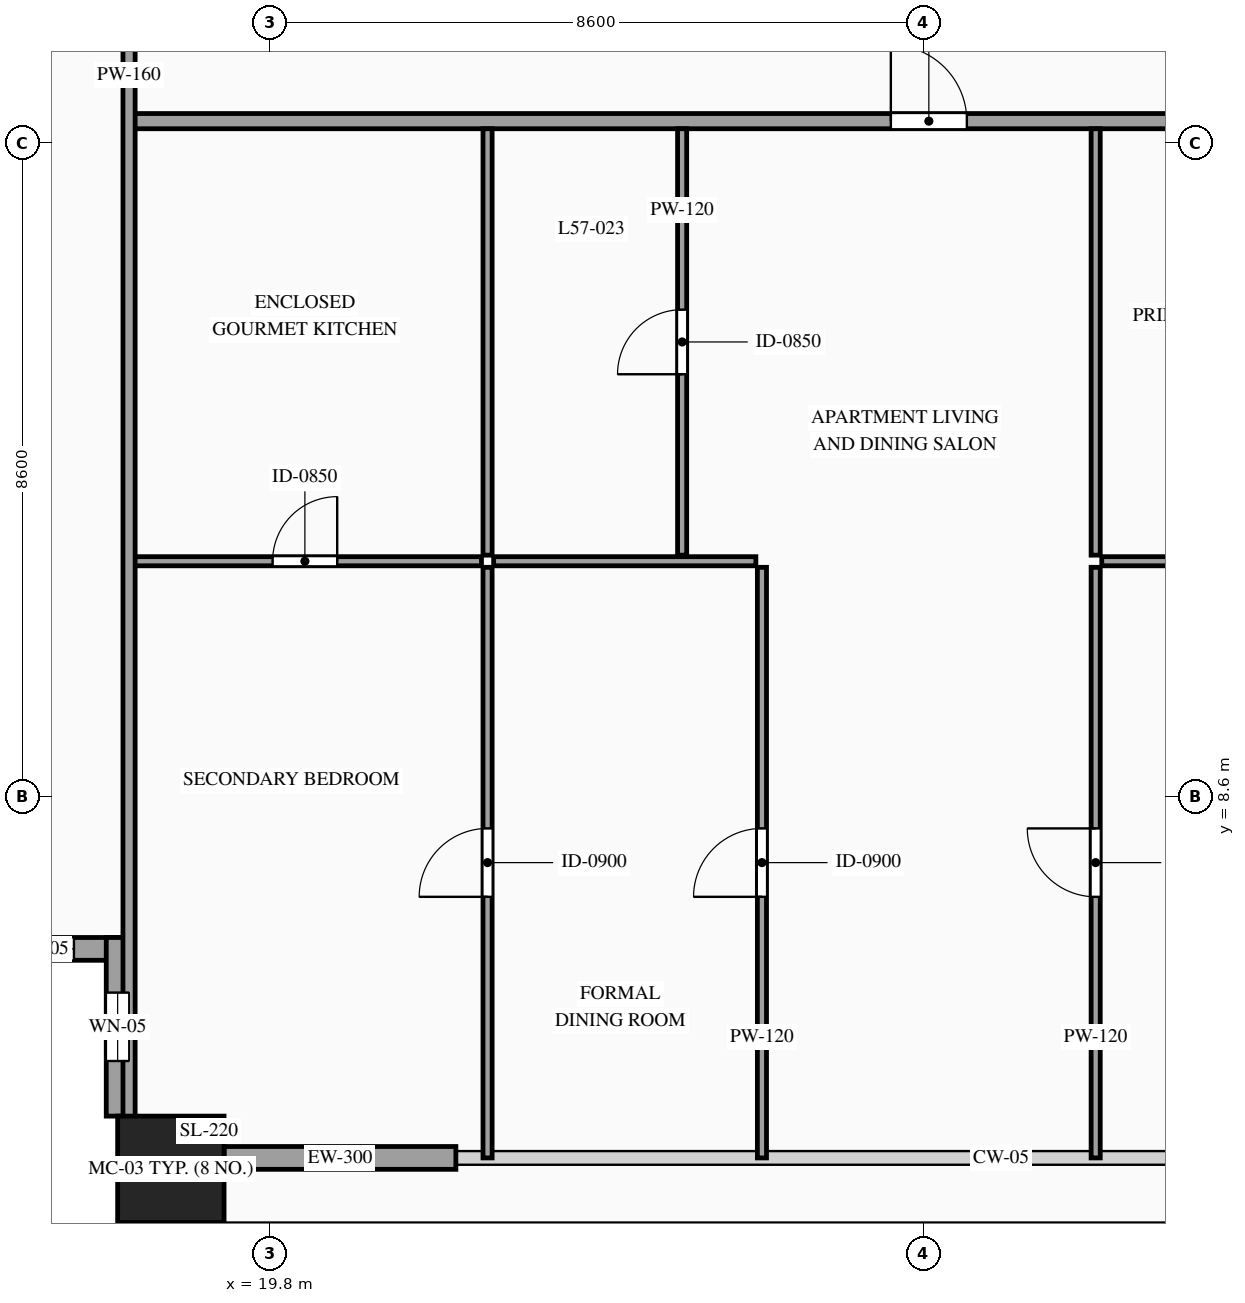
"""IFC4 building model, lengths in metres.
Left out: names, types, materials, properties, quantities, classifications, styles, units other than length and angle.
Written with IfcOpenShell. Run it as: python <this file> out.ifc"""

import sys

from ifc_helpers import new_model, si_unit, direction, frame, frame_2d, origin, origin_2d, place, context, subcontext, project, spatial, rectangle, hollow_rectangle, extrude, source, transform, mapped, element, fill, save


model = new_model("IFC4")
c1 = context("Model", 3, precision=1e-05, world=origin(), true_north=direction((0.0, 1.0)))
c2 = subcontext(c1, "Body", "Model", "MODEL_VIEW")
j1 = project(units=[si_unit("LENGTHUNIT", "METRE"), si_unit("PLANEANGLEUNIT", "RADIAN")], contexts=[c1])
p1 = place(None, origin())
s1 = spatial("IfcSite", under=j1, at=p1, CompositionType="ELEMENT")
p2 = place(p1, origin())
s2 = spatial("IfcBuilding", under=s1, at=p2, CompositionType="ELEMENT")
p3 = place(p2, frame((0.0, 0.0, 216.0)))
s3 = spatial("IfcBuildingStorey", under=s2, at=p3, CompositionType="ELEMENT", Elevation=216.0)
m1 = source(origin(), c2, "Body", "SweptSolid", [
    extrude(hollow_rectangle(XDim=1.4, YDim=1.4, WallThickness=0.06, at=origin_2d()), origin(), (0.0, 0.0, 1.0), 3.22),
])
p4 = place(p3, frame((18.5, 3.7, 0.0), z_axis=(0.0, 0.0, 1.0), x_axis=(1.0, 0.0, 0.0)))
e1 = element("IfcColumn", 1, at=p4, inside=s3, PredefinedType="COLUMN", context=c2, shape_type="MappedRepresentation", body=[
    mapped(m1, transform((0.0, 0.0, 0.0), scale=1.0)),
])
p5 = place(p3, frame((15.6, 6.6, 0.0), z_axis=(0.0, 0.0, 1.0), x_axis=(1.0, 0.0, 0.0)))
e2 = element("IfcWall", 2, at=p5, inside=s3, PredefinedType="SOLIDWALL", context=c2, shape_type="SweptSolid", body=[
    extrude(rectangle(XDim=2.35, YDim=0.3, at=frame_2d((1.175, 0.0))), origin(), (0.0, 0.0, 1.0), 3.22),
])
p6 = place(p5, frame((0.725, 0.0, 0.75)))
e3 = element("IfcOpeningElement", 3, at=p6, cuts=e2, PredefinedType="OPENING", context=c2, shape_type="SweptSolid", body=[
    extrude(rectangle(XDim=0.9, YDim=1.5, at=frame_2d((0.45, 0.75))), frame((0.0, 0.165, 0.0), z_axis=(0.0, -1.0, 0.0), x_axis=(1.0, 0.0, 0.0)), (0.0, 0.0, 1.0), 0.33),
])
p7 = place(p3, frame((17.8, 6.75, 0.0), z_axis=(0.0, 0.0, 1.0), x_axis=(0.0, -1.0, 0.0)))
e4 = element("IfcWall", 4, at=p7, inside=s3, PredefinedType="SOLIDWALL", context=c2, shape_type="SweptSolid", body=[
    extrude(rectangle(XDim=2.35, YDim=0.3, at=frame_2d((1.175, 0.0))), origin(), (0.0, 0.0, 1.0), 3.22),
])
p8 = place(p7, frame((0.725, 0.0, 0.75)))
e5 = element("IfcOpeningElement", 5, at=p8, cuts=e4, PredefinedType="OPENING", context=c2, shape_type="SweptSolid", body=[
    extrude(rectangle(XDim=0.9, YDim=1.5, at=frame_2d((0.45, 0.75))), frame((0.0, 0.165, 0.0), z_axis=(0.0, -1.0, 0.0), x_axis=(1.0, 0.0, 0.0)), (0.0, 0.0, 1.0), 0.33),
])
m2 = source(origin(), c2, "Body", "SweptSolid", [
    extrude(rectangle(XDim=3.05, YDim=0.3, at=frame_2d((1.525, 0.0))), origin(), (0.0, 0.0, 1.0), 2.775),
])
p9 = place(p3, frame((19.2, 3.85, 0.0), z_axis=(0.0, 0.0, 1.0), x_axis=(1.0, 0.0, 0.0)))
e6 = element("IfcWall", 6, at=p9, inside=s3, PredefinedType="SOLIDWALL", context=c2, shape_type="MappedRepresentation", body=[
    mapped(m2, transform((0.0, 0.0, 0.0), scale=1.0)),
])
p10 = place(p3, frame((17.94, 17.49, 0.0), z_axis=(0.0, 0.0, 1.0), x_axis=(1.0, 0.0, 0.0)))
e7 = element("IfcWall", 7, at=p10, inside=s3, PredefinedType="PARTITIONING", context=c2, shape_type="SweptSolid", body=[
    extrude(rectangle(XDim=17.455, YDim=0.2, at=frame_2d((8.728, 0.0))), origin(), (0.0, 0.0, 1.0), 3.22),
])
p11 = place(p10, frame((10.033, 0.0, 0.0)))
e8 = element("IfcOpeningElement", 8, at=p11, cuts=e7, PredefinedType="OPENING", context=c2, shape_type="SweptSolid", body=[
    extrude(rectangle(XDim=1.0, YDim=2.2, at=frame_2d((0.5, 1.1))), frame((0.0, 0.115, 0.0), z_axis=(0.0, -1.0, 0.0), x_axis=(1.0, 0.0, 0.0)), (0.0, 0.0, 1.0), 0.23),
])
p12 = place(p3, frame((17.94, 11.7, 0.0), z_axis=(0.0, 0.0, 1.0), x_axis=(1.0, 0.0, 0.0)))
e9 = element("IfcWall", 9, at=p12, inside=s3, PredefinedType="PARTITIONING", context=c2, shape_type="SweptSolid", body=[
    extrude(rectangle(XDim=4.647, YDim=0.12, at=frame_2d((2.323, 0.0))), origin(), (0.0, 0.0, 1.0), 3.22),
])
p13 = place(p12, frame((1.898, 0.0, 0.0)))
e10 = element("IfcOpeningElement", 10, at=p13, cuts=e9, PredefinedType="OPENING", context=c2, shape_type="SweptSolid", body=[
    extrude(rectangle(XDim=0.85, YDim=2.1, at=frame_2d((0.425, 1.05))), frame((0.0, 0.075, 0.0), z_axis=(0.0, -1.0, 0.0), x_axis=(1.0, 0.0, 0.0)), (0.0, 0.0, 1.0), 0.15),
])
m3 = source(origin(), c2, "Body", "SweptSolid", [
    extrude(rectangle(XDim=5.61, YDim=0.12, at=frame_2d((2.805, 0.0))), origin(), (0.0, 0.0, 1.0), 1.615),
])
p14 = place(p3, frame((22.667, 11.78, 0.0), z_axis=(0.0, 0.0, 1.0), x_axis=(0.0, 1.0, 0.0)))
e11 = element("IfcWall", 11, at=p14, inside=s3, PredefinedType="PARTITIONING", context=c2, shape_type="MappedRepresentation", body=[
    mapped(m3, transform((0.0, 0.0, 0.0), scale=1.0)),
])
p15 = place(p3, frame((25.227, 11.78, 0.0), z_axis=(0.0, 0.0, 1.0), x_axis=(0.0, 1.0, 0.0)))
e12 = element("IfcWall", 12, at=p15, inside=s3, PredefinedType="PARTITIONING", context=c2, shape_type="SweptSolid", body=[
    extrude(rectangle(XDim=5.61, YDim=0.12, at=frame_2d((2.805, 0.0))), origin(), (0.0, 0.0, 1.0), 3.22),
])
p16 = place(p15, frame((2.38, 0.0, 0.0)))
e13 = element("IfcOpeningElement", 13, at=p16, cuts=e12, PredefinedType="OPENING", context=c2, shape_type="SweptSolid", body=[
    extrude(rectangle(XDim=0.85, YDim=2.1, at=frame_2d((0.425, 1.05))), frame((0.0, 0.075, 0.0), z_axis=(0.0, -1.0, 0.0), x_axis=(1.0, 0.0, 0.0)), (0.0, 0.0, 1.0), 0.15),
])
p17 = place(p3, frame((30.748, 11.7, 0.0), z_axis=(0.0, 0.0, 1.0), x_axis=(1.0, 0.0, 0.0)))
e14 = element("IfcWall", 14, at=p17, inside=s3, PredefinedType="PARTITIONING", context=c2, shape_type="SweptSolid", body=[
    extrude(rectangle(XDim=4.647, YDim=0.12, at=frame_2d((2.323, 0.0))), origin(), (0.0, 0.0, 1.0), 3.22),
])
p18 = place(p17, frame((1.898, 0.0, 0.0)))
e15 = element("IfcOpeningElement", 15, at=p18, cuts=e14, PredefinedType="OPENING", context=c2, shape_type="SweptSolid", body=[
    extrude(rectangle(XDim=0.85, YDim=2.1, at=frame_2d((0.425, 1.05))), frame((0.0, 0.075, 0.0), z_axis=(0.0, -1.0, 0.0), x_axis=(1.0, 0.0, 0.0)), (0.0, 0.0, 1.0), 0.15),
])
m4 = source(origin(), c2, "Body", "SweptSolid", [
    extrude(rectangle(XDim=5.61, YDim=0.12, at=frame_2d((2.805, 0.0))), origin(), (0.0, 0.0, 1.0), 3.22),
])
p19 = place(p3, frame((30.668, 11.78, 0.0), z_axis=(0.0, 0.0, 1.0), x_axis=(0.0, 1.0, 0.0)))
e16 = element("IfcWall", 16, at=p19, inside=s3, PredefinedType="PARTITIONING", context=c2, shape_type="MappedRepresentation", body=[
    mapped(m4, transform((0.0, 0.0, 0.0), scale=1.0)),
])
p20 = place(p3, frame((22.667, 3.85, 0.0), z_axis=(0.0, 0.0, 1.0), x_axis=(0.0, 1.0, 0.0)))
e17 = element("IfcWall", 17, at=p20, inside=s3, PredefinedType="PARTITIONING", context=c2, shape_type="SweptSolid", body=[
    extrude(rectangle(XDim=7.77, YDim=0.12, at=frame_2d((3.885, 0.0))), origin(), (0.0, 0.0, 1.0), 3.22),
])
p21 = place(p20, frame((3.435, 0.0, 0.0)))
e18 = element("IfcOpeningElement", 18, at=p21, cuts=e17, PredefinedType="OPENING", context=c2, shape_type="SweptSolid", body=[
    extrude(rectangle(XDim=0.9, YDim=2.15, at=frame_2d((0.45, 1.075))), frame((0.0, 0.075, 0.0), z_axis=(0.0, -1.0, 0.0), x_axis=(1.0, 0.0, 0.0)), (0.0, 0.0, 1.0), 0.15),
])
p22 = place(p3, frame((30.668, 3.85, 0.0), z_axis=(0.0, 0.0, 1.0), x_axis=(0.0, 1.0, 0.0)))
e19 = element("IfcWall", 19, at=p22, inside=s3, PredefinedType="PARTITIONING", context=c2, shape_type="SweptSolid", body=[
    extrude(rectangle(XDim=7.77, YDim=0.12, at=frame_2d((3.885, 0.0))), origin(), (0.0, 0.0, 1.0), 3.22),
])
p23 = place(p22, frame((3.435, 0.0, 0.0)))
e20 = element("IfcOpeningElement", 20, at=p23, cuts=e19, PredefinedType="OPENING", context=c2, shape_type="SweptSolid", body=[
    extrude(rectangle(XDim=0.9, YDim=2.15, at=frame_2d((0.45, 1.075))), frame((0.0, 0.075, 0.0), z_axis=(0.0, -1.0, 0.0), x_axis=(1.0, 0.0, 0.0)), (0.0, 0.0, 1.0), 0.15),
])
m5 = source(origin(), c2, "Body", "SweptSolid", [
    extrude(rectangle(XDim=3.45, YDim=0.12, at=frame_2d((1.725, 0.0))), origin(), (0.0, 0.0, 1.0), 3.22),
])
p24 = place(p3, frame((22.747, 11.7, 0.0), z_axis=(0.0, 0.0, 1.0), x_axis=(1.0, 0.0, 0.0)))
e21 = element("IfcWall", 21, at=p24, inside=s3, PredefinedType="PARTITIONING", context=c2, shape_type="MappedRepresentation", body=[
    mapped(m5, transform((0.0, 0.0, 0.0), scale=1.0)),
])
p25 = place(p3, frame((26.277, 3.85, 0.0), z_axis=(0.0, 0.0, 1.0), x_axis=(0.0, 1.0, 0.0)))
e22 = element("IfcWall", 22, at=p25, inside=s3, PredefinedType="PARTITIONING", context=c2, shape_type="SweptSolid", body=[
    extrude(rectangle(XDim=7.77, YDim=0.12, at=frame_2d((3.885, 0.0))), origin(), (0.0, 0.0, 1.0), 3.22),
])
p26 = place(p25, frame((3.435, 0.0, 0.0)))
e23 = element("IfcOpeningElement", 23, at=p26, cuts=e22, PredefinedType="OPENING", context=c2, shape_type="SweptSolid", body=[
    extrude(rectangle(XDim=0.9, YDim=2.15, at=frame_2d((0.45, 1.075))), frame((0.0, 0.075, 0.0), z_axis=(0.0, -1.0, 0.0), x_axis=(1.0, 0.0, 0.0)), (0.0, 0.0, 1.0), 0.15),
])
m6 = source(origin(), c2, "Body", "SweptSolid", [
    extrude(rectangle(XDim=28.19, YDim=0.16, at=frame_2d((14.095, 0.0))), origin(), (0.0, 0.0, 1.0), 3.22),
])
p27 = place(p3, frame((17.95, 4.0, 0.0), z_axis=(0.0, 0.0, 1.0), x_axis=(0.0, 1.0, 0.0)))
e24 = element("IfcWall", 24, at=p27, inside=s3, PredefinedType="PARTITIONING", context=c2, shape_type="MappedRepresentation", body=[
    mapped(m6, transform((0.0, 0.0, 0.0), scale=1.0)),
])
m7 = source(origin(), c2, "Body", "SweptSolid", [
    extrude(rectangle(XDim=0.9, YDim=1.5, at=frame_2d((0.45, 0.75))), frame((0.0, 0.03, 0.0), z_axis=(0.0, -1.0, 0.0), x_axis=(1.0, 0.0, 0.0)), (0.0, 0.0, 1.0), 0.06),
])
p28 = place(p6, origin())
e25 = element("IfcWindow", 25, at=p28, inside=s3, PartitioningType="SINGLE_PANEL", PredefinedType="WINDOW", context=c2, shape_type="MappedRepresentation", body=[
    mapped(m7, transform((0.0, 0.0, 0.0), scale=1.0)),
])
fill(e3, e25)
p29 = place(p8, origin())
e26 = element("IfcWindow", 26, at=p29, inside=s3, PartitioningType="SINGLE_PANEL", PredefinedType="WINDOW", context=c2, shape_type="MappedRepresentation", body=[
    mapped(m7, transform((0.0, 0.0, 0.0), scale=1.0)),
])
fill(e5, e26)
m8 = source(origin(), c2, "Body", "SweptSolid", [
    extrude(rectangle(XDim=1.0, YDim=2.2, at=frame_2d((0.5, 1.1))), frame((0.0, 0.025, 0.0), z_axis=(0.0, -1.0, 0.0), x_axis=(1.0, 0.0, 0.0)), (0.0, 0.0, 1.0), 0.05),
])
p30 = place(p11, origin())
e27 = element("IfcDoor", 27, at=p30, inside=s3, OperationType="SINGLE_SWING_LEFT", PredefinedType="DOOR", context=c2, shape_type="MappedRepresentation", body=[
    mapped(m8, transform((0.0, 0.0, 0.0), scale=1.0)),
])
fill(e8, e27)
m9 = source(origin(), c2, "Body", "SweptSolid", [
    extrude(rectangle(XDim=0.85, YDim=2.1, at=frame_2d((0.425, 1.05))), frame((0.0, 0.025, 0.0), z_axis=(0.0, -1.0, 0.0), x_axis=(1.0, 0.0, 0.0)), (0.0, 0.0, 1.0), 0.05),
])
p31 = place(p13, origin())
e28 = element("IfcDoor", 28, at=p31, inside=s3, OperationType="SINGLE_SWING_RIGHT", PredefinedType="DOOR", context=c2, shape_type="MappedRepresentation", body=[
    mapped(m9, transform((0.0, 0.0, 0.0), scale=1.0)),
])
fill(e10, e28)
p32 = place(p16, origin())
e29 = element("IfcDoor", 29, at=p32, inside=s3, OperationType="SINGLE_SWING_LEFT", PredefinedType="DOOR", context=c2, shape_type="MappedRepresentation", body=[
    mapped(m9, transform((0.0, 0.0, 0.0), scale=1.0)),
])
fill(e13, e29)
m10 = source(origin(), c2, "Body", "SweptSolid", [
    extrude(rectangle(XDim=0.9, YDim=2.15, at=frame_2d((0.45, 1.075))), frame((0.0, 0.025, 0.0), z_axis=(0.0, -1.0, 0.0), x_axis=(1.0, 0.0, 0.0)), (0.0, 0.0, 1.0), 0.05),
])
p33 = place(p21, origin())
e30 = element("IfcDoor", 30, at=p33, inside=s3, OperationType="SINGLE_SWING_LEFT", PredefinedType="DOOR", context=c2, shape_type="MappedRepresentation", body=[
    mapped(m10, transform((0.0, 0.0, 0.0), scale=1.0)),
])
fill(e18, e30)
p34 = place(p23, origin())
e31 = element("IfcDoor", 31, at=p34, inside=s3, OperationType="SINGLE_SWING_RIGHT", PredefinedType="DOOR", context=c2, shape_type="MappedRepresentation", body=[
    mapped(m10, transform((0.0, 0.0, 0.0), scale=1.0)),
])
fill(e20, e31)
p35 = place(p26, origin())
e32 = element("IfcDoor", 32, at=p35, inside=s3, OperationType="SINGLE_SWING_LEFT", PredefinedType="DOOR", context=c2, shape_type="MappedRepresentation", body=[
    mapped(m10, transform((0.0, 0.0, 0.0), scale=1.0)),
])
fill(e23, e32)
save(model, sys.argv[1])
